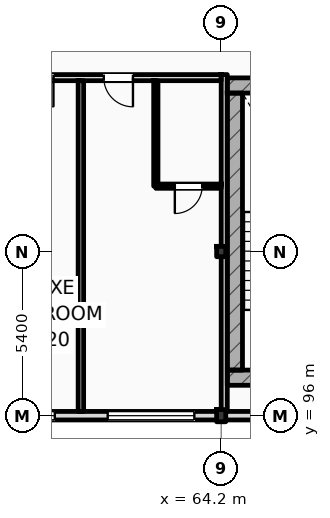
"""IFC4 building model, lengths in metres.
Left out: names, types, materials, properties, quantities, classifications, styles, units other than length and angle.
Written with IfcOpenShell. Run it as: python <this file> out.ifc"""

import sys

from ifc_helpers import new_model, si_unit, direction, frame, frame_2d, origin, origin_2d, place, context, subcontext, project, spatial, rectangle, i_section, extrude, element, fill, save


model = new_model("IFC4")
c1 = context("Model", 3, precision=1e-05, world=origin(), true_north=direction((0.0, 1.0)))
c2 = subcontext(c1, "Body", "Model", "MODEL_VIEW")
j1 = project(units=[si_unit("LENGTHUNIT", "METRE"), si_unit("PLANEANGLEUNIT", "RADIAN")], contexts=[c1])
p1 = place(None, origin())
s1 = spatial("IfcSite", under=j1, at=p1, CompositionType="ELEMENT")
p2 = place(p1, origin())
s2 = spatial("IfcBuilding", under=s1, at=p2, CompositionType="ELEMENT")
p3 = place(p2, frame((0.0, 0.0, 39.0)))
s3 = spatial("IfcBuildingStorey", under=s2, at=p3, CompositionType="ELEMENT", Elevation=39.0)
p4 = place(p3, frame((64.2, 96.0, 0.0), z_axis=(0.0, 0.0, 1.0), x_axis=(1.0, 0.0, 0.0)))
e1 = element("IfcColumn", 1, at=p4, inside=s3, PredefinedType="COLUMN", context=c2, shape_type="SweptSolid", body=[
    extrude(i_section(OverallWidth=0.3, OverallDepth=0.4, WebThickness=0.013, FlangeThickness=0.024, FilletRadius=0.027, at=origin_2d()), origin(), (0.0, 0.0, 1.0), 3.6),
])
p5 = place(p3, frame((64.2, 101.4, 0.0), z_axis=(0.0, 0.0, 1.0), x_axis=(1.0, 0.0, 0.0)))
e2 = element("IfcColumn", 2, at=p5, inside=s3, PredefinedType="COLUMN", context=c2, shape_type="SweptSolid", body=[
    extrude(i_section(OverallWidth=0.3, OverallDepth=0.34, WebThickness=0.012, FlangeThickness=0.021, FilletRadius=0.027, at=origin_2d()), origin(), (0.0, 0.0, 1.0), 3.6),
])
for number, where, z_axis, x_axis in (
    (3, (64.4, 106.862, 0.0), (0.0, 0.0, 1.0), (1.0, 0.0, 0.0)),
    (4, (64.4, 97.25, 0.0), (0.0, 0.0, 1.0), (1.0, 0.0, 0.0)),
):
    element("IfcWall", number, at=place(p3, frame(where, z_axis=z_axis, x_axis=x_axis)), inside=s3, PredefinedType="SHEAR", context=c2, shape_type="SweptSolid", body=[
        extrude(rectangle(XDim=5.16, YDim=0.5, at=frame_2d((2.58, 0.0))), origin(), (0.0, 0.0, 1.0), 3.6),
    ])
p6 = place(p3, frame((64.65, 97.5, 0.0), z_axis=(0.0, 0.0, 1.0), x_axis=(0.0, 1.0, 0.0)))
e5 = element("IfcWall", 5, at=p6, inside=s3, PredefinedType="SHEAR", context=c2, shape_type="SweptSolid", body=[
    extrude(rectangle(XDim=9.112, YDim=0.5, at=frame_2d((4.556, 0.0))), origin(), (0.0, 0.0, 1.0), 3.6),
])
p7 = place(p3, frame((25.2, 96.0, 0.0), z_axis=(0.0, 0.0, 1.0), x_axis=(1.0, 0.0, 0.0)))
e6 = element("IfcWall", 6, at=p7, inside=s3, PredefinedType="STANDARD", context=c2, shape_type="SweptSolid", body=[
    extrude(rectangle(XDim=70.2, YDim=0.28, at=frame_2d((35.1, 0.0))), origin(), (0.0, 0.0, 1.0), 2.92),
])
p8 = place(p7, frame((16.695, 0.0, 0.9)))
e7 = element("IfcOpeningElement", 7, at=p8, cuts=e6, PredefinedType="OPENING", context=c2, shape_type="SweptSolid", body=[
    extrude(rectangle(XDim=2.25, YDim=1.84, at=frame_2d((1.125, 0.92))), frame((0.0, 0.15, 0.0), z_axis=(0.0, -1.0, 0.0), x_axis=(1.0, 0.0, 0.0)), (0.0, 0.0, 1.0), 0.3),
])
p9 = place(p7, frame((20.748, 0.0, 0.9)))
e8 = element("IfcOpeningElement", 8, at=p9, cuts=e6, PredefinedType="OPENING", context=c2, shape_type="SweptSolid", body=[
    extrude(rectangle(XDim=1.8, YDim=1.84, at=frame_2d((0.9, 0.92))), frame((0.0, 0.15, 0.0), z_axis=(0.0, -1.0, 0.0), x_axis=(1.0, 0.0, 0.0)), (0.0, 0.0, 1.0), 0.3),
])
p10 = place(p7, frame((25.963, 0.0, 0.9)))
e9 = element("IfcOpeningElement", 9, at=p10, cuts=e6, PredefinedType="OPENING", context=c2, shape_type="SweptSolid", body=[
    extrude(rectangle(XDim=2.55, YDim=1.84, at=frame_2d((1.275, 0.92))), frame((0.0, 0.15, 0.0), z_axis=(0.0, -1.0, 0.0), x_axis=(1.0, 0.0, 0.0)), (0.0, 0.0, 1.0), 0.3),
])
p11 = place(p7, frame((32.177, 0.0, 0.9)))
e10 = element("IfcOpeningElement", 10, at=p11, cuts=e6, PredefinedType="OPENING", context=c2, shape_type="SweptSolid", body=[
    extrude(rectangle(XDim=1.35, YDim=1.84, at=frame_2d((0.675, 0.92))), frame((0.0, 0.15, 0.0), z_axis=(0.0, -1.0, 0.0), x_axis=(1.0, 0.0, 0.0)), (0.0, 0.0, 1.0), 0.3),
])
p12 = place(p7, frame((35.267, 0.0, 0.9)))
e11 = element("IfcOpeningElement", 11, at=p12, cuts=e6, PredefinedType="OPENING", context=c2, shape_type="SweptSolid", body=[
    extrude(rectangle(XDim=2.85, YDim=1.84, at=frame_2d((1.425, 0.92))), frame((0.0, 0.15, 0.0), z_axis=(0.0, -1.0, 0.0), x_axis=(1.0, 0.0, 0.0)), (0.0, 0.0, 1.0), 0.3),
])
p13 = place(p7, frame((55.56, 0.0, 0.9)))
e12 = element("IfcOpeningElement", 12, at=p13, cuts=e6, PredefinedType="OPENING", context=c2, shape_type="SweptSolid", body=[
    extrude(rectangle(XDim=1.8, YDim=1.84, at=frame_2d((0.9, 0.92))), frame((0.0, 0.15, 0.0), z_axis=(0.0, -1.0, 0.0), x_axis=(1.0, 0.0, 0.0)), (0.0, 0.0, 1.0), 0.3),
])
p14 = place(p7, frame((59.093, 0.0, 0.9)))
e13 = element("IfcOpeningElement", 13, at=p14, cuts=e6, PredefinedType="OPENING", context=c2, shape_type="SweptSolid", body=[
    extrude(rectangle(XDim=2.412, YDim=1.84, at=frame_2d((1.206, 0.92))), frame((0.0, 0.15, 0.0), z_axis=(0.0, -1.0, 0.0), x_axis=(1.0, 0.0, 0.0)), (0.0, 0.0, 1.0), 0.3),
])
p15 = place(p7, frame((63.325, 0.0, 0.9)))
e14 = element("IfcOpeningElement", 14, at=p15, cuts=e6, PredefinedType="OPENING", context=c2, shape_type="SweptSolid", body=[
    extrude(rectangle(XDim=1.8, YDim=1.84, at=frame_2d((0.9, 0.92))), frame((0.0, 0.15, 0.0), z_axis=(0.0, -1.0, 0.0), x_axis=(1.0, 0.0, 0.0)), (0.0, 0.0, 1.0), 0.3),
])
p16 = place(p7, frame((66.718, 0.0, 0.9)))
e15 = element("IfcOpeningElement", 15, at=p16, cuts=e6, PredefinedType="OPENING", context=c2, shape_type="SweptSolid", body=[
    extrude(rectangle(XDim=2.472, YDim=1.84, at=frame_2d((1.236, 0.92))), frame((0.0, 0.15, 0.0), z_axis=(0.0, -1.0, 0.0), x_axis=(1.0, 0.0, 0.0)), (0.0, 0.0, 1.0), 0.3),
])
p17 = place(p3, frame((40.76, 107.12, 0.0), z_axis=(0.0, 0.0, 1.0), x_axis=(1.0, 0.0, 0.0)))
e16 = element("IfcWall", 16, at=p17, inside=s3, PredefinedType="PARTITIONING", context=c2, shape_type="SweptSolid", body=[
    extrude(rectangle(XDim=23.44, YDim=0.2, at=frame_2d((11.72, 0.0))), origin(), (0.0, 0.0, 1.0), 3.38),
])
p18 = place(p17, frame((2.855, 0.0, 0.0)))
e17 = element("IfcOpeningElement", 17, at=p18, cuts=e16, PredefinedType="OPENING", context=c2, shape_type="SweptSolid", body=[
    extrude(rectangle(XDim=0.96, YDim=2.2, at=frame_2d((0.48, 1.1))), frame((0.0, 0.11, 0.0), z_axis=(0.0, -1.0, 0.0), x_axis=(1.0, 0.0, 0.0)), (0.0, 0.0, 1.0), 0.22),
])
p19 = place(p17, frame((5.433, 0.0, 0.0)))
e18 = element("IfcOpeningElement", 18, at=p19, cuts=e16, PredefinedType="OPENING", context=c2, shape_type="SweptSolid", body=[
    extrude(rectangle(XDim=0.96, YDim=2.2, at=frame_2d((0.48, 1.1))), frame((0.0, 0.11, 0.0), z_axis=(0.0, -1.0, 0.0), x_axis=(1.0, 0.0, 0.0)), (0.0, 0.0, 1.0), 0.22),
])
p20 = place(p17, frame((12.273, 0.0, 0.0)))
e19 = element("IfcOpeningElement", 19, at=p20, cuts=e16, PredefinedType="OPENING", context=c2, shape_type="SweptSolid", body=[
    extrude(rectangle(XDim=0.96, YDim=2.2, at=frame_2d((0.48, 1.1))), frame((0.0, 0.11, 0.0), z_axis=(0.0, -1.0, 0.0), x_axis=(1.0, 0.0, 0.0)), (0.0, 0.0, 1.0), 0.22),
])
p21 = place(p17, frame((16.963, 0.0, 0.0)))
e20 = element("IfcOpeningElement", 20, at=p21, cuts=e16, PredefinedType="OPENING", context=c2, shape_type="SweptSolid", body=[
    extrude(rectangle(XDim=0.96, YDim=2.2, at=frame_2d((0.48, 1.1))), frame((0.0, 0.11, 0.0), z_axis=(0.0, -1.0, 0.0), x_axis=(1.0, 0.0, 0.0)), (0.0, 0.0, 1.0), 0.22),
])
p22 = place(p17, frame((19.578, 0.0, 0.0)))
e21 = element("IfcOpeningElement", 21, at=p22, cuts=e16, PredefinedType="OPENING", context=c2, shape_type="SweptSolid", body=[
    extrude(rectangle(XDim=0.96, YDim=2.2, at=frame_2d((0.48, 1.1))), frame((0.0, 0.11, 0.0), z_axis=(0.0, -1.0, 0.0), x_axis=(1.0, 0.0, 0.0)), (0.0, 0.0, 1.0), 0.22),
])
p23 = place(p3, frame((64.3, 96.14, 0.0), z_axis=(0.0, 0.0, 1.0), x_axis=(0.0, 1.0, 0.0)))
e22 = element("IfcWall", 22, at=p23, inside=s3, PredefinedType="PARTITIONING", context=c2, shape_type="SweptSolid", body=[
    extrude(rectangle(XDim=11.08, YDim=0.2, at=frame_2d((5.54, 0.0))), origin(), (0.0, 0.0, 1.0), 3.01),
])
p24 = place(p3, frame((59.585, 96.14, 0.0), z_axis=(0.0, 0.0, 1.0), x_axis=(0.0, 1.0, 0.0)))
e23 = element("IfcWall", 23, at=p24, inside=s3, PredefinedType="PARTITIONING", context=c2, shape_type="SweptSolid", body=[
    extrude(rectangle(XDim=10.88, YDim=0.18, at=frame_2d((5.44, 0.0))), origin(), (0.0, 0.0, 1.0), 3.38),
])
p25 = place(p3, frame((62.05, 103.55, 0.0), z_axis=(0.0, 0.0, 1.0), x_axis=(0.0, 1.0, 0.0)))
e24 = element("IfcWall", 24, at=p25, inside=s3, PredefinedType="PARTITIONING", context=c2, shape_type="SweptSolid", body=[
    extrude(rectangle(XDim=3.47, YDim=0.14, at=frame_2d((1.735, 0.0))), origin(), (0.0, 0.0, 1.0), 3.38),
])
p26 = place(p3, frame((62.05, 103.55, 0.0), z_axis=(0.0, 0.0, 1.0), x_axis=(1.0, 0.0, 0.0)))
e25 = element("IfcWall", 25, at=p26, inside=s3, PredefinedType="PARTITIONING", context=c2, shape_type="SweptSolid", body=[
    extrude(rectangle(XDim=2.15, YDim=0.14, at=frame_2d((1.075, 0.0))), origin(), (0.0, 0.0, 1.0), 3.38),
])
p27 = place(p26, frame((0.625, 0.0, 0.0)))
e26 = element("IfcOpeningElement", 26, at=p27, cuts=e25, PredefinedType="OPENING", context=c2, shape_type="SweptSolid", body=[
    extrude(rectangle(XDim=0.9, YDim=2.1, at=frame_2d((0.45, 1.05))), frame((0.0, 0.08, 0.0), z_axis=(0.0, -1.0, 0.0), x_axis=(1.0, 0.0, 0.0)), (0.0, 0.0, 1.0), 0.16),
])
p28 = place(p11, origin())
e27 = element("IfcWindow", 27, at=p28, inside=s3, PartitioningType="DOUBLE_PANEL_VERTICAL", PredefinedType="WINDOW", context=c2, shape_type="SweptSolid", body=[
    extrude(rectangle(XDim=1.35, YDim=1.84, at=frame_2d((0.675, 0.92))), frame((0.0, 0.03, 0.0), z_axis=(0.0, -1.0, 0.0), x_axis=(1.0, 0.0, 0.0)), (0.0, 0.0, 1.0), 0.06),
])
fill(e10, e27)
p29 = place(p12, origin())
e28 = element("IfcWindow", 28, at=p29, inside=s3, PartitioningType="DOUBLE_PANEL_VERTICAL", PredefinedType="WINDOW", context=c2, shape_type="SweptSolid", body=[
    extrude(rectangle(XDim=2.85, YDim=1.84, at=frame_2d((1.425, 0.92))), frame((0.0, 0.03, 0.0), z_axis=(0.0, -1.0, 0.0), x_axis=(1.0, 0.0, 0.0)), (0.0, 0.0, 1.0), 0.06),
])
fill(e11, e28)
p30 = place(p21, frame((0.96, 0.0, 0.0), z_axis=(0.0, 0.0, 1.0), x_axis=(-1.0, 0.0, 0.0)))
e29 = element("IfcDoor", 29, at=p30, inside=s3, OperationType="SINGLE_SWING_RIGHT", PredefinedType="DOOR", context=c2, shape_type="SweptSolid", body=[
    extrude(rectangle(XDim=0.96, YDim=2.2, at=frame_2d((0.48, 1.1))), frame((0.0, 0.025, 0.0), z_axis=(0.0, -1.0, 0.0), x_axis=(1.0, 0.0, 0.0)), (0.0, 0.0, 1.0), 0.05),
])
fill(e20, e29)
p31 = place(p22, frame((0.96, 0.0, 0.0), z_axis=(0.0, 0.0, 1.0), x_axis=(-1.0, 0.0, 0.0)))
e30 = element("IfcDoor", 30, at=p31, inside=s3, OperationType="SINGLE_SWING_RIGHT", PredefinedType="DOOR", context=c2, shape_type="SweptSolid", body=[
    extrude(rectangle(XDim=0.96, YDim=2.2, at=frame_2d((0.48, 1.1))), frame((0.0, 0.025, 0.0), z_axis=(0.0, -1.0, 0.0), x_axis=(1.0, 0.0, 0.0)), (0.0, 0.0, 1.0), 0.05),
])
fill(e21, e30)
p32 = place(p27, frame((0.9, 0.0, 0.0), z_axis=(0.0, 0.0, 1.0), x_axis=(-1.0, 0.0, 0.0)))
e31 = element("IfcDoor", 31, at=p32, inside=s3, OperationType="SINGLE_SWING_LEFT", PredefinedType="DOOR", context=c2, shape_type="SweptSolid", body=[
    extrude(rectangle(XDim=0.9, YDim=2.1, at=frame_2d((0.45, 1.05))), frame((0.0, 0.025, 0.0), z_axis=(0.0, -1.0, 0.0), x_axis=(1.0, 0.0, 0.0)), (0.0, 0.0, 1.0), 0.05),
])
fill(e26, e31)
save(model, sys.argv[1])
